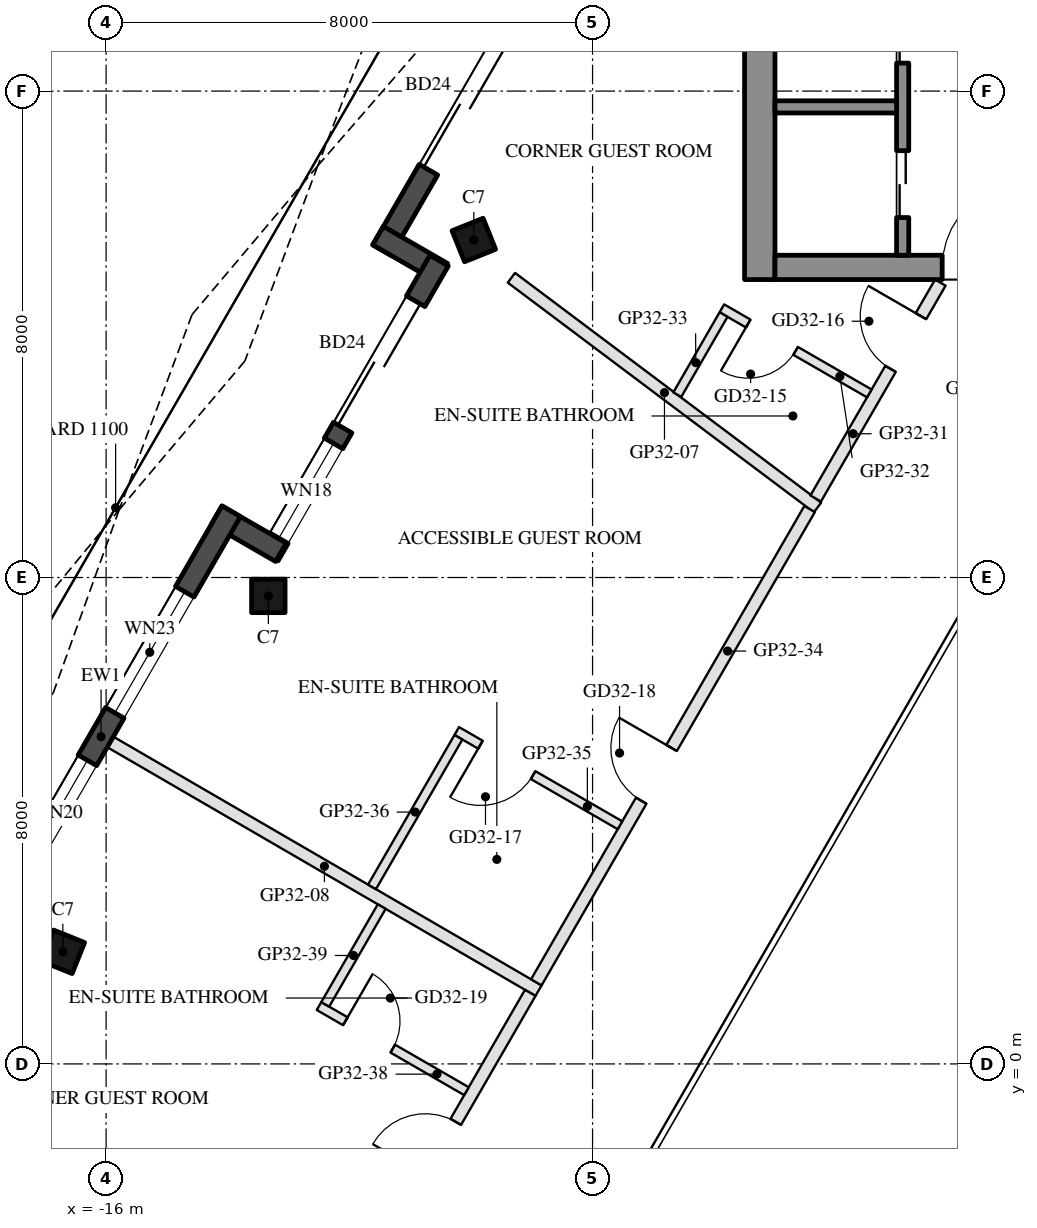
"""IFC4 building model, lengths in metres.
Left out: names, types, materials, properties, quantities, classifications, styles, units other than length and angle.
Written with IfcOpenShell. Run it as: python <this file> out.ifc"""

import sys

from ifc_helpers import new_model, si_unit, direction, frame, frame_2d, origin, origin_2d, place, context, subcontext, project, spatial, rectangle, hollow_rectangle, extrude, boolean, halfspace, element, fill, save


model = new_model("IFC4")
c1 = context("Model", 3, precision=1e-05, world=origin(), true_north=direction((0.0, 1.0)))
c2 = subcontext(c1, "Body", "Model", "MODEL_VIEW")
j1 = project(units=[si_unit("LENGTHUNIT", "METRE"), si_unit("PLANEANGLEUNIT", "RADIAN")], contexts=[c1])
p1 = place(None, origin())
s1 = spatial("IfcSite", under=j1, at=p1, CompositionType="ELEMENT")
p2 = place(p1, origin())
s2 = spatial("IfcBuilding", under=s1, at=p2, CompositionType="ELEMENT")
p3 = place(p2, frame((0.0, 0.0, 309.6)))
s3 = spatial("IfcBuildingStorey", under=s2, at=p3, CompositionType="ELEMENT", Elevation=309.6)
p4 = place(p3, frame((-9.953, 13.551, 0.0), z_axis=(0.100518860507, -0.128252691192, 0.98663428173), x_axis=(0.503004973265, 0.862140661686, 0.060823320673)))
e1 = element("IfcColumn", 1, at=p4, inside=s3, PredefinedType="COLUMN", context=c2, shape_type="SweptSolid", body=[
    boolean("DIFFERENCE", boolean("DIFFERENCE", extrude(hollow_rectangle(XDim=0.55, YDim=0.55, WallThickness=0.025, at=origin_2d()), origin(), (0.0, 0.0, 1.0), 3.75), halfspace(frame((0.0, 0.0, 0.034), z_axis=(0.0, 0.0, 1.0), x_axis=(1.0, 0.0, 0.0)), True)), halfspace(frame((0.0, 0.0, 3.716), z_axis=(0.0, 0.0, 1.0), x_axis=(1.0, 0.0, 0.0)), False)),
])
p5 = place(p3, frame((-13.332, 7.697, 0.0), z_axis=(0.131164739211, -0.075724645561, 0.988464257949), x_axis=(0.499893753664, 0.866086736301, 1.5860259e-05)))
e2 = element("IfcColumn", 2, at=p5, inside=s3, PredefinedType="COLUMN", context=c2, shape_type="SweptSolid", body=[
    boolean("DIFFERENCE", boolean("DIFFERENCE", extrude(hollow_rectangle(XDim=0.55, YDim=0.55, WallThickness=0.025, at=origin_2d()), origin(), (0.0, 0.0, 1.0), 3.743), halfspace(frame((0.0, 0.0, 0.031), z_axis=(0.0, 0.0, 1.0), x_axis=(1.0, 0.0, 0.0)), True)), halfspace(frame((0.0, 0.0, 3.711), z_axis=(0.0, 0.0, 1.0), x_axis=(1.0, 0.0, 0.0)), False)),
])
p6 = place(p3, frame((-16.711, 1.844, 0.0), z_axis=(0.161388519526, -0.022915997932, 0.986624854139), x_axis=(-0.495109873729, -0.866696335889, 0.060857820306)))
e3 = element("IfcColumn", 3, at=p6, inside=s3, PredefinedType="COLUMN", context=c2, shape_type="SweptSolid", body=[
    boolean("DIFFERENCE", boolean("DIFFERENCE", extrude(hollow_rectangle(XDim=0.55, YDim=0.55, WallThickness=0.025, at=origin_2d()), origin(), (0.0, 0.0, 1.0), 3.75), halfspace(frame((0.0, 0.0, 0.034), z_axis=(0.0, 0.0, 1.0), x_axis=(1.0, 0.0, 0.0)), True)), halfspace(frame((0.0, 0.0, 3.716), z_axis=(0.0, 0.0, 1.0), x_axis=(1.0, 0.0, 0.0)), False)),
])
p7 = place(p3, frame((-6.344, 22.251, 0.0), z_axis=(0.0, 0.0, 1.0), x_axis=(-0.499983205548, -0.866035099848, 0.0)))
e4 = element("IfcWall", 4, at=p7, inside=s3, PredefinedType="SOLIDWALL", context=c2, shape_type="SweptSolid", body=[
    extrude(rectangle(XDim=10.239, YDim=0.35, at=frame_2d((5.12, 0.0))), origin(), (0.0, 0.0, 1.0), 3.55),
])
p8 = place(p7, frame((0.381, 0.0, 0.3)))
e5 = element("IfcOpeningElement", 5, at=p8, cuts=e4, PredefinedType="OPENING", context=c2, shape_type="SweptSolid", body=[
    extrude(rectangle(XDim=1.5, YDim=2.65, at=frame_2d((0.75, 1.325))), frame((0.0, 0.185, 0.0), z_axis=(0.0, -1.0, 0.0), x_axis=(1.0, 0.0, 0.0)), (0.0, 0.0, 1.0), 0.37),
])
p9 = place(p7, frame((6.31, 0.0, 0.0)))
e6 = element("IfcOpeningElement", 6, at=p9, cuts=e4, PredefinedType="OPENING", context=c2, shape_type="SweptSolid", body=[
    extrude(rectangle(XDim=2.4, YDim=2.4, at=frame_2d((1.2, 1.2))), frame((0.0, 0.185, 0.0), z_axis=(0.0, -1.0, 0.0), x_axis=(1.0, 0.0, 0.0)), (0.0, 0.0, 1.0), 0.37),
])
p10 = place(p7, frame((3.667, 0.0, 0.3)))
e7 = element("IfcOpeningElement", 7, at=p10, cuts=e4, PredefinedType="OPENING", context=c2, shape_type="SweptSolid", body=[
    extrude(rectangle(XDim=2.3, YDim=2.65, at=frame_2d((1.15, 1.325))), frame((0.0, 0.185, 0.0), z_axis=(0.0, -1.0, 0.0), x_axis=(1.0, 0.0, 0.0)), (0.0, 0.0, 1.0), 0.37),
])
p11 = place(p3, frame((-11.528, 13.623, 0.0), z_axis=(0.0, 0.0, 1.0), x_axis=(0.866005645448, -0.500034220881, 0.0)))
e8 = element("IfcWall", 8, at=p11, inside=s3, PredefinedType="SOLIDWALL", context=c2, shape_type="SweptSolid", body=[
    extrude(rectangle(XDim=1.22, YDim=0.35, at=frame_2d((0.61, 0.0))), origin(), (0.0, 0.0, 1.0), 3.55),
])
p12 = place(p3, frame((-10.524, 13.211, 0.0), z_axis=(0.0, 0.0, 1.0), x_axis=(-0.500008054862, -0.866020753258, 0.0)))
e9 = element("IfcWall", 9, at=p12, inside=s3, PredefinedType="SOLIDWALL", context=c2, shape_type="SweptSolid", body=[
    extrude(rectangle(XDim=5.599, YDim=0.35, at=frame_2d((2.8, 0.0))), origin(), (0.0, 0.0, 1.0), 3.55),
])
p13 = place(p12, frame((0.77, 0.0, 0.0)))
e10 = element("IfcOpeningElement", 10, at=p13, cuts=e9, PredefinedType="OPENING", context=c2, shape_type="SweptSolid", body=[
    extrude(rectangle(XDim=2.4, YDim=2.4, at=frame_2d((1.2, 1.2))), frame((0.0, 0.185, 0.0), z_axis=(0.0, -1.0, 0.0), x_axis=(1.0, 0.0, 0.0)), (0.0, 0.0, 1.0), 0.37),
])
p14 = place(p12, frame((3.47, 0.0, 0.3)))
e11 = element("IfcOpeningElement", 11, at=p14, cuts=e9, PredefinedType="OPENING", context=c2, shape_type="SweptSolid", body=[
    extrude(rectangle(XDim=1.8, YDim=2.65, at=frame_2d((0.9, 1.325))), frame((0.0, 0.185, 0.0), z_axis=(0.0, -1.0, 0.0), x_axis=(1.0, 0.0, 0.0)), (0.0, 0.0, 1.0), 0.37),
])
p15 = place(p3, frame((-13.125, 8.415, 0.0), z_axis=(0.0, 0.0, 1.0), x_axis=(-0.865955602162, 0.500120880472, 0.0)))
e12 = element("IfcWall", 12, at=p15, inside=s3, PredefinedType="SOLIDWALL", context=c2, shape_type="SweptSolid", body=[
    extrude(rectangle(XDim=1.22, YDim=0.35, at=frame_2d((0.61, 0.0))), origin(), (0.0, 0.0, 1.0), 3.55),
])
p16 = place(p3, frame((-13.943, 9.089, 0.0), z_axis=(0.0, 0.0, 1.0), x_axis=(-0.500013816581, -0.866017426631, 0.0)))
e13 = element("IfcWall", 13, at=p16, inside=s3, PredefinedType="SOLIDWALL", context=c2, shape_type="SweptSolid", body=[
    extrude(rectangle(XDim=8.559, YDim=0.35, at=frame_2d((4.279, 0.0))), origin(), (0.0, 0.0, 1.0), 3.55),
])
p17 = place(p16, frame((1.528, 0.0, 0.3)))
e14 = element("IfcOpeningElement", 14, at=p17, cuts=e13, PredefinedType="OPENING", context=c2, shape_type="SweptSolid", body=[
    extrude(rectangle(XDim=2.3, YDim=2.65, at=frame_2d((1.15, 1.325))), frame((0.0, 0.185, 0.0), z_axis=(0.0, -1.0, 0.0), x_axis=(1.0, 0.0, 0.0)), (0.0, 0.0, 1.0), 0.37),
])
p18 = place(p16, frame((4.729, 0.0, 0.3)))
e15 = element("IfcOpeningElement", 15, at=p18, cuts=e13, PredefinedType="OPENING", context=c2, shape_type="SweptSolid", body=[
    extrude(rectangle(XDim=2.0, YDim=2.65, at=frame_2d((1.0, 1.325))), frame((0.0, 0.185, 0.0), z_axis=(0.0, -1.0, 0.0), x_axis=(1.0, 0.0, 0.0)), (0.0, 0.0, 1.0), 0.37),
])
p19 = place(p3, frame((-5.25, 12.9, 0.0), z_axis=(0.0, 0.0, 1.0), x_axis=(0.0, 1.0, 0.0)))
e16 = element("IfcWall", 16, at=p19, inside=s3, PredefinedType="SHEAR", context=c2, shape_type="SweptSolid", body=[
    extrude(rectangle(XDim=10.299, YDim=0.5, at=frame_2d((5.149, 0.0))), origin(), (0.0, 0.0, 1.0), 3.5),
])
p20 = place(p3, frame((5.0, 13.1, 0.0), z_axis=(0.0, 0.0, 1.0), x_axis=(-1.0, 0.0, 0.0)))
e17 = element("IfcWall", 17, at=p20, inside=s3, PredefinedType="SHEAR", context=c2, shape_type="SweptSolid", body=[
    extrude(rectangle(XDim=10.0, YDim=0.4, at=frame_2d((5.0, 0.0))), origin(), (0.0, 0.0, 1.0), 3.5),
])
p21 = place(p20, frame((3.55, 0.0, 0.0)))
e18 = element("IfcOpeningElement", 18, at=p21, cuts=e17, PredefinedType="OPENING", context=c2, shape_type="SweptSolid", body=[
    extrude(rectangle(XDim=1.1, YDim=2.1, at=frame_2d((0.55, 1.05))), frame((0.0, 0.21, 0.0), z_axis=(0.0, -1.0, 0.0), x_axis=(1.0, 0.0, 0.0)), (0.0, 0.0, 1.0), 0.42),
])
p22 = place(p20, frame((5.85, 0.0, 0.0)))
e19 = element("IfcOpeningElement", 19, at=p22, cuts=e17, PredefinedType="OPENING", context=c2, shape_type="SweptSolid", body=[
    extrude(rectangle(XDim=1.4, YDim=2.1, at=frame_2d((0.7, 1.05))), frame((0.0, 0.21, 0.0), z_axis=(0.0, -1.0, 0.0), x_axis=(1.0, 0.0, 0.0)), (0.0, 0.0, 1.0), 0.42),
])
p23 = place(p3, frame((-2.9, 13.3, 0.0), z_axis=(0.0, 0.0, 1.0), x_axis=(0.0, 1.0, 0.0)))
e20 = element("IfcWall", 20, at=p23, inside=s3, PredefinedType="SHEAR", context=c2, shape_type="SweptSolid", body=[
    extrude(rectangle(XDim=10.16, YDim=0.2, at=frame_2d((5.08, 0.0))), origin(), (0.0, 0.0, 1.0), 3.5),
])
p24 = place(p23, frame((0.62, 0.0, 0.0)))
e21 = element("IfcOpeningElement", 21, at=p24, cuts=e20, PredefinedType="OPENING", context=c2, shape_type="SweptSolid", body=[
    extrude(rectangle(XDim=1.1, YDim=2.1, at=frame_2d((0.55, 1.05))), frame((0.0, 0.11, 0.0), z_axis=(0.0, -1.0, 0.0), x_axis=(1.0, 0.0, 0.0)), (0.0, 0.0, 1.0), 0.22),
])
p25 = place(p23, frame((3.16, 0.0, 0.0)))
e22 = element("IfcOpeningElement", 22, at=p25, cuts=e20, PredefinedType="OPENING", context=c2, shape_type="SweptSolid", body=[
    extrude(rectangle(XDim=1.1, YDim=2.1, at=frame_2d((0.55, 1.05))), frame((0.0, 0.11, 0.0), z_axis=(0.0, -1.0, 0.0), x_axis=(1.0, 0.0, 0.0)), (0.0, 0.0, 1.0), 0.22),
])
p26 = place(p23, frame((5.7, 0.0, 0.0)))
e23 = element("IfcOpeningElement", 23, at=p26, cuts=e20, PredefinedType="OPENING", context=c2, shape_type="SweptSolid", body=[
    extrude(rectangle(XDim=1.1, YDim=2.1, at=frame_2d((0.55, 1.05))), frame((0.0, 0.11, 0.0), z_axis=(0.0, -1.0, 0.0), x_axis=(1.0, 0.0, 0.0)), (0.0, 0.0, 1.0), 0.22),
])
p27 = place(p23, frame((8.34, 0.0, 0.0)))
e24 = element("IfcOpeningElement", 24, at=p27, cuts=e20, PredefinedType="OPENING", context=c2, shape_type="SweptSolid", body=[
    extrude(rectangle(XDim=0.9, YDim=2.1, at=frame_2d((0.45, 1.05))), frame((0.0, 0.11, 0.0), z_axis=(0.0, -1.0, 0.0), x_axis=(1.0, 0.0, 0.0)), (0.0, 0.0, 1.0), 0.22),
])
p28 = place(p3, frame((-3.0, 15.74, 0.0), z_axis=(0.0, 0.0, 1.0), x_axis=(-1.0, 0.0, 0.0)))
e25 = element("IfcWall", 25, at=p28, inside=s3, PredefinedType="SHEAR", context=c2, shape_type="SweptSolid", body=[
    extrude(rectangle(XDim=2.0, YDim=0.2, at=frame_2d((1.0, 0.0))), origin(), (0.0, 0.0, 1.0), 3.5),
])
p29 = place(p3, frame((-9.334, 12.93, 0.0), z_axis=(0.0, 0.0, 1.0), x_axis=(0.799864994536, -0.600179965107, 0.0)))
e26 = element("IfcWall", 26, at=p29, inside=s3, PredefinedType="PARTITIONING", context=c2, shape_type="SweptSolid", body=[
    extrude(rectangle(XDim=6.294, YDim=0.2, at=frame_2d((3.147, 0.0))), origin(), (0.0, 0.0, 1.0), 3.1),
])
p30 = place(p3, frame((-15.931, 5.296, 0.0), z_axis=(0.0, 0.0, 1.0), x_axis=(0.86472973631, -0.502237476839, 0.0)))
e27 = element("IfcWall", 27, at=p30, inside=s3, PredefinedType="PARTITIONING", context=c2, shape_type="SweptSolid", body=[
    extrude(rectangle(XDim=8.145, YDim=0.2, at=frame_2d((4.072, 0.0))), origin(), (0.0, 0.0, 1.0), 3.1),
])
p31 = place(p3, frame((-4.33, 9.3, 0.0), z_axis=(0.0, 0.0, 1.0), x_axis=(0.500007699544, 0.866020958405, 0.0)))
e28 = element("IfcWall", 28, at=p31, inside=s3, PredefinedType="PARTITIONING", context=c2, shape_type="SweptSolid", body=[
    extrude(rectangle(XDim=4.1, YDim=0.2, at=frame_2d((2.05, 0.0))), origin(), (0.0, 0.0, 1.0), 3.1),
])
p32 = place(p31, frame((2.462, 0.0, 0.0)))
e29 = element("IfcOpeningElement", 29, at=p32, cuts=e28, PredefinedType="OPENING", context=c2, shape_type="SweptSolid", body=[
    extrude(rectangle(XDim=1.0, YDim=2.1, at=frame_2d((0.5, 1.05))), frame((0.0, 0.11, 0.0), z_axis=(0.0, -1.0, 0.0), x_axis=(1.0, 0.0, 0.0)), (0.0, 0.0, 1.0), 0.22),
])
p33 = place(p3, frame((-3.448, 11.027, 0.0), z_axis=(0.0, 0.0, 1.0), x_axis=(-0.866034573852, 0.49998411664, 0.0)))
e30 = element("IfcWall", 30, at=p33, inside=s3, PredefinedType="PARTITIONING", context=c2, shape_type="SweptSolid", body=[
    extrude(rectangle(XDim=2.8, YDim=0.15, at=frame_2d((1.4, 0.0))), origin(), (0.0, 0.0, 1.0), 3.55),
])
p34 = place(p33, frame((1.4, 0.0, 0.0)))
e31 = element("IfcOpeningElement", 31, at=p34, cuts=e30, PredefinedType="OPENING", context=c2, shape_type="SweptSolid", body=[
    extrude(rectangle(XDim=0.9, YDim=2.1, at=frame_2d((0.45, 1.05))), frame((0.0, 0.085, 0.0), z_axis=(0.0, -1.0, 0.0), x_axis=(1.0, 0.0, 0.0)), (0.0, 0.0, 1.0), 0.17),
])
p35 = place(p3, frame((-5.846, 12.325, 0.0), z_axis=(0.0, 0.0, 1.0), x_axis=(-0.500023511883, -0.866011828767, 0.0)))
e32 = element("IfcWall", 32, at=p35, inside=s3, PredefinedType="PARTITIONING", context=c2, shape_type="SweptSolid", body=[
    extrude(rectangle(XDim=1.521, YDim=0.15, at=frame_2d((0.76, 0.0))), origin(), (0.0, 0.0, 1.0), 3.1),
])
p36 = place(p3, frame((-8.925, 1.342, 0.0), z_axis=(0.0, 0.0, 1.0), x_axis=(0.500010106406, 0.866019568769, 0.0)))
e33 = element("IfcWall", 33, at=p36, inside=s3, PredefinedType="PARTITIONING", context=c2, shape_type="SweptSolid", body=[
    extrude(rectangle(XDim=8.988, YDim=0.2, at=frame_2d((4.494, 0.0))), origin(), (0.0, 0.0, 1.0), 3.1),
])
p37 = place(p36, frame((3.45, 0.0, 0.0)))
e34 = element("IfcOpeningElement", 34, at=p37, cuts=e33, PredefinedType="OPENING", context=c2, shape_type="SweptSolid", body=[
    extrude(rectangle(XDim=1.0, YDim=2.1, at=frame_2d((0.5, 1.05))), frame((0.0, 0.11, 0.0), z_axis=(0.0, -1.0, 0.0), x_axis=(1.0, 0.0, 0.0)), (0.0, 0.0, 1.0), 0.22),
])
p38 = place(p3, frame((-7.549, 3.925, 0.0), z_axis=(0.0, 0.0, 1.0), x_axis=(-0.866063626216, 0.499933790963, 0.0)))
e35 = element("IfcWall", 35, at=p38, inside=s3, PredefinedType="PARTITIONING", context=c2, shape_type="SweptSolid", body=[
    extrude(rectangle(XDim=3.1, YDim=0.15, at=frame_2d((1.55, 0.0))), origin(), (0.0, 0.0, 1.0), 3.55),
])
p39 = place(p38, frame((1.65, 0.0, 0.0)))
e36 = element("IfcOpeningElement", 36, at=p39, cuts=e35, PredefinedType="OPENING", context=c2, shape_type="SweptSolid", body=[
    extrude(rectangle(XDim=1.0, YDim=2.1, at=frame_2d((0.5, 1.05))), frame((0.0, 0.085, 0.0), z_axis=(0.0, -1.0, 0.0), x_axis=(1.0, 0.0, 0.0)), (0.0, 0.0, 1.0), 0.17),
])
p40 = place(p3, frame((-10.206, 5.373, 0.0), z_axis=(0.0, 0.0, 1.0), x_axis=(-0.500009958894, -0.866019653938, 0.0)))
e37 = element("IfcWall", 37, at=p40, inside=s3, PredefinedType="PARTITIONING", context=c2, shape_type="SweptSolid", body=[
    extrude(rectangle(XDim=2.842, YDim=0.15, at=frame_2d((1.421, 0.0))), origin(), (0.0, 0.0, 1.0), 3.1),
])
p41 = place(p3, frame((-12.269, -4.45, 0.0), z_axis=(0.0, 0.0, 1.0), x_axis=(0.500024296538, 0.866011375717, 0.0)))
e38 = element("IfcWall", 38, at=p41, inside=s3, PredefinedType="PARTITIONING", context=c2, shape_type="SweptSolid", body=[
    extrude(rectangle(XDim=6.488, YDim=0.2, at=frame_2d((3.244, 0.0))), origin(), (0.0, 0.0, 1.0), 3.1),
])
p42 = place(p41, frame((3.038, 0.0, 0.0)))
e39 = element("IfcOpeningElement", 39, at=p42, cuts=e38, PredefinedType="OPENING", context=c2, shape_type="SweptSolid", body=[
    extrude(rectangle(XDim=1.0, YDim=2.1, at=frame_2d((0.5, 1.05))), frame((0.0, 0.11, 0.0), z_axis=(0.0, -1.0, 0.0), x_axis=(1.0, 0.0, 0.0)), (0.0, 0.0, 1.0), 0.22),
])
p43 = place(p3, frame((-12.499, 0.952, 0.0), z_axis=(0.0, 0.0, 1.0), x_axis=(0.865996816683, -0.500049511043, 0.0)))
e40 = element("IfcWall", 40, at=p43, inside=s3, PredefinedType="PARTITIONING", context=c2, shape_type="SweptSolid", body=[
    extrude(rectangle(XDim=2.8, YDim=0.15, at=frame_2d((1.4, 0.0))), origin(), (0.0, 0.0, 1.0), 3.55),
])
p44 = place(p43, frame((0.5, 0.0, 0.0)))
e41 = element("IfcOpeningElement", 41, at=p44, cuts=e40, PredefinedType="OPENING", context=c2, shape_type="SweptSolid", body=[
    extrude(rectangle(XDim=0.9, YDim=2.1, at=frame_2d((0.45, 1.05))), frame((0.0, 0.085, 0.0), z_axis=(0.0, -1.0, 0.0), x_axis=(1.0, 0.0, 0.0)), (0.0, 0.0, 1.0), 0.17),
])
p45 = place(p3, frame((-11.468, 2.587, 0.0), z_axis=(0.0, 0.0, 1.0), x_axis=(-0.499999386358, -0.86602575807, 0.0)))
e42 = element("IfcWall", 42, at=p45, inside=s3, PredefinedType="PARTITIONING", context=c2, shape_type="SweptSolid", body=[
    extrude(rectangle(XDim=1.857, YDim=0.15, at=frame_2d((0.928, 0.0))), origin(), (0.0, 0.0, 1.0), 3.55),
])
p46 = place(p9, frame((2.4, 0.0, 0.0), z_axis=(0.0, 0.0, 1.0), x_axis=(-1.0, 0.0, 0.0)))
e43 = element("IfcDoor", 43, at=p46, inside=s3, OperationType="SLIDING_TO_LEFT", PredefinedType="DOOR", context=c2, shape_type="SweptSolid", body=[
    extrude(rectangle(XDim=2.4, YDim=2.4, at=frame_2d((1.2, 1.2))), frame((0.0, 0.025, 0.0), z_axis=(0.0, -1.0, 0.0), x_axis=(1.0, 0.0, 0.0)), (0.0, 0.0, 1.0), 0.05),
])
fill(e6, e43)
p47 = place(p13, frame((2.4, 0.0, 0.0), z_axis=(0.0, 0.0, 1.0), x_axis=(-1.0, 0.0, 0.0)))
e44 = element("IfcDoor", 44, at=p47, inside=s3, OperationType="SLIDING_TO_LEFT", PredefinedType="DOOR", context=c2, shape_type="SweptSolid", body=[
    extrude(rectangle(XDim=2.4, YDim=2.4, at=frame_2d((1.2, 1.2))), frame((0.0, 0.025, 0.0), z_axis=(0.0, -1.0, 0.0), x_axis=(1.0, 0.0, 0.0)), (0.0, 0.0, 1.0), 0.05),
])
fill(e10, e44)
p48 = place(p14, origin())
e45 = element("IfcWindow", 45, at=p48, inside=s3, PartitioningType="SINGLE_PANEL", PredefinedType="WINDOW", context=c2, shape_type="SweptSolid", body=[
    extrude(rectangle(XDim=1.8, YDim=2.65, at=frame_2d((0.9, 1.325))), frame((0.0, 0.03, 0.0), z_axis=(0.0, -1.0, 0.0), x_axis=(1.0, 0.0, 0.0)), (0.0, 0.0, 1.0), 0.06),
])
fill(e11, e45)
p49 = place(p17, origin())
e46 = element("IfcWindow", 46, at=p49, inside=s3, PartitioningType="SINGLE_PANEL", PredefinedType="WINDOW", context=c2, shape_type="SweptSolid", body=[
    extrude(rectangle(XDim=2.3, YDim=2.65, at=frame_2d((1.15, 1.325))), frame((0.0, 0.03, 0.0), z_axis=(0.0, -1.0, 0.0), x_axis=(1.0, 0.0, 0.0)), (0.0, 0.0, 1.0), 0.06),
])
fill(e14, e46)
p50 = place(p18, origin())
e47 = element("IfcWindow", 47, at=p50, inside=s3, PartitioningType="SINGLE_PANEL", PredefinedType="WINDOW", context=c2, shape_type="SweptSolid", body=[
    extrude(rectangle(XDim=2.0, YDim=2.65, at=frame_2d((1.0, 1.325))), frame((0.0, 0.03, 0.0), z_axis=(0.0, -1.0, 0.0), x_axis=(1.0, 0.0, 0.0)), (0.0, 0.0, 1.0), 0.06),
])
fill(e15, e47)
p51 = place(p24, origin())
e48 = element("IfcDoor", 48, at=p51, inside=s3, OperationType="DOUBLE_DOOR_SLIDING", PredefinedType="DOOR", context=c2, shape_type="SweptSolid", body=[
    extrude(rectangle(XDim=1.1, YDim=2.1, at=frame_2d((0.55, 1.05))), frame((0.0, 0.025, 0.0), z_axis=(0.0, -1.0, 0.0), x_axis=(1.0, 0.0, 0.0)), (0.0, 0.0, 1.0), 0.05),
])
fill(e21, e48)
p52 = place(p25, origin())
e49 = element("IfcDoor", 49, at=p52, inside=s3, OperationType="DOUBLE_DOOR_SLIDING", PredefinedType="DOOR", context=c2, shape_type="SweptSolid", body=[
    extrude(rectangle(XDim=1.1, YDim=2.1, at=frame_2d((0.55, 1.05))), frame((0.0, 0.025, 0.0), z_axis=(0.0, -1.0, 0.0), x_axis=(1.0, 0.0, 0.0)), (0.0, 0.0, 1.0), 0.05),
])
fill(e22, e49)
p53 = place(p22, frame((1.4, 0.0, 0.0), z_axis=(0.0, 0.0, 1.0), x_axis=(-1.0, 0.0, 0.0)))
e50 = element("IfcDoor", 50, at=p53, inside=s3, OperationType="DOUBLE_DOOR_SINGLE_SWING", PredefinedType="DOOR", context=c2, shape_type="SweptSolid", body=[
    extrude(rectangle(XDim=1.4, YDim=2.1, at=frame_2d((0.7, 1.05))), frame((0.0, 0.025, 0.0), z_axis=(0.0, -1.0, 0.0), x_axis=(1.0, 0.0, 0.0)), (0.0, 0.0, 1.0), 0.05),
])
fill(e19, e50)
p54 = place(p34, origin())
e51 = element("IfcDoor", 51, at=p54, inside=s3, OperationType="SINGLE_SWING_RIGHT", PredefinedType="DOOR", context=c2, shape_type="SweptSolid", body=[
    extrude(rectangle(XDim=0.9, YDim=2.1, at=frame_2d((0.45, 1.05))), frame((0.0, 0.025, 0.0), z_axis=(0.0, -1.0, 0.0), x_axis=(1.0, 0.0, 0.0)), (0.0, 0.0, 1.0), 0.05),
])
fill(e31, e51)
p55 = place(p32, origin())
e52 = element("IfcDoor", 52, at=p55, inside=s3, OperationType="SINGLE_SWING_RIGHT", PredefinedType="DOOR", context=c2, shape_type="SweptSolid", body=[
    extrude(rectangle(XDim=1.0, YDim=2.1, at=frame_2d((0.5, 1.05))), frame((0.0, 0.025, 0.0), z_axis=(0.0, -1.0, 0.0), x_axis=(1.0, 0.0, 0.0)), (0.0, 0.0, 1.0), 0.05),
])
fill(e29, e52)
p56 = place(p39, origin())
e53 = element("IfcDoor", 53, at=p56, inside=s3, OperationType="SINGLE_SWING_RIGHT", PredefinedType="DOOR", context=c2, shape_type="SweptSolid", body=[
    extrude(rectangle(XDim=1.0, YDim=2.1, at=frame_2d((0.5, 1.05))), frame((0.0, 0.025, 0.0), z_axis=(0.0, -1.0, 0.0), x_axis=(1.0, 0.0, 0.0)), (0.0, 0.0, 1.0), 0.05),
])
fill(e36, e53)
p57 = place(p37, origin())
e54 = element("IfcDoor", 54, at=p57, inside=s3, OperationType="SINGLE_SWING_RIGHT", PredefinedType="DOOR", context=c2, shape_type="SweptSolid", body=[
    extrude(rectangle(XDim=1.0, YDim=2.1, at=frame_2d((0.5, 1.05))), frame((0.0, 0.025, 0.0), z_axis=(0.0, -1.0, 0.0), x_axis=(1.0, 0.0, 0.0)), (0.0, 0.0, 1.0), 0.05),
])
fill(e34, e54)
p58 = place(p44, origin())
e55 = element("IfcDoor", 55, at=p58, inside=s3, OperationType="SINGLE_SWING_LEFT", PredefinedType="DOOR", context=c2, shape_type="SweptSolid", body=[
    extrude(rectangle(XDim=0.9, YDim=2.1, at=frame_2d((0.45, 1.05))), frame((0.0, 0.025, 0.0), z_axis=(0.0, -1.0, 0.0), x_axis=(1.0, 0.0, 0.0)), (0.0, 0.0, 1.0), 0.05),
])
fill(e41, e55)
p59 = place(p42, origin())
e56 = element("IfcDoor", 56, at=p59, inside=s3, OperationType="SINGLE_SWING_LEFT", PredefinedType="DOOR", context=c2, shape_type="SweptSolid", body=[
    extrude(rectangle(XDim=1.0, YDim=2.1, at=frame_2d((0.5, 1.05))), frame((0.0, 0.025, 0.0), z_axis=(0.0, -1.0, 0.0), x_axis=(1.0, 0.0, 0.0)), (0.0, 0.0, 1.0), 0.05),
])
fill(e39, e56)
save(model, sys.argv[1])
